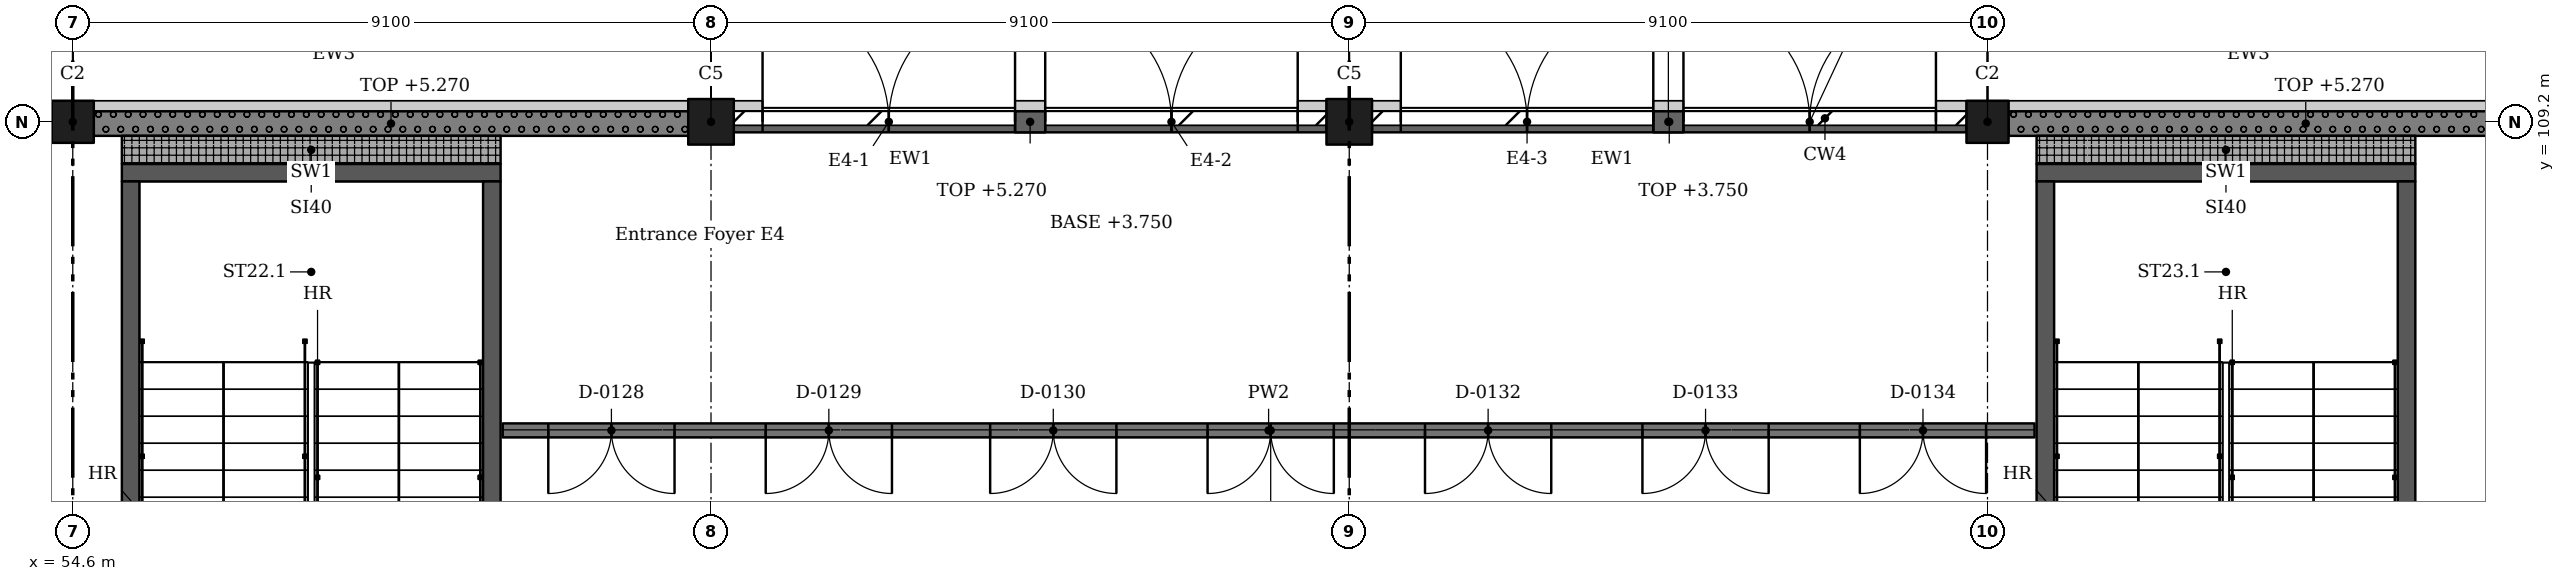
"""IFC4 building model, lengths in metres.
Left out: names, types, materials, properties, quantities, classifications, styles, units other than length and angle.
Written with IfcOpenShell. Run it as: python <this file> out.ifc"""

import sys

from ifc_helpers import new_model, si_unit, direction, frame, frame_2d, origin, origin_2d, place, context, subcontext, project, spatial, rectangle, extrude, element, fill, save


model = new_model("IFC4")
c1 = context("Model", 3, precision=1e-05, world=origin(), true_north=direction((0.0, 1.0)))
c2 = subcontext(c1, "Body", "Model", "MODEL_VIEW")
j1 = project(units=[si_unit("LENGTHUNIT", "METRE"), si_unit("PLANEANGLEUNIT", "RADIAN")], contexts=[c1])
p1 = place(None, origin())
s1 = spatial("IfcSite", under=j1, at=p1, CompositionType="ELEMENT")
p2 = place(p1, origin())
s2 = spatial("IfcBuilding", under=s1, at=p2, CompositionType="ELEMENT")
p3 = place(p2, origin())
s3 = spatial("IfcBuildingStorey", under=s2, at=p3, CompositionType="ELEMENT", Elevation=0.0)
p4 = place(p3, frame((54.6, 109.2, -0.4), z_axis=(0.0, 0.0, 1.0), x_axis=(1.0, 0.0, 0.0)))
e1 = element("IfcColumn", 1, at=p4, inside=s3, PredefinedType="COLUMN", context=c2, shape_type="SweptSolid", body=[
    extrude(rectangle(XDim=0.6, YDim=0.6, at=origin_2d()), origin(), (0.0, 0.0, 1.0), 6.77),
])
for number, where, z_axis, x_axis in (
    (2, (63.7, 109.2, -0.4), (0.0, 0.0, 1.0), (1.0, 0.0, 0.0)),
    (3, (72.8, 109.2, -0.4), (0.0, 0.0, 1.0), (1.0, 0.0, 0.0)),
):
    element("IfcColumn", number, at=place(p3, frame(where, z_axis=z_axis, x_axis=x_axis)), inside=s3, PredefinedType="COLUMN", context=c2, shape_type="SweptSolid", body=[
        extrude(rectangle(XDim=0.65, YDim=0.65, at=origin_2d()), origin(), (0.0, 0.0, 1.0), 6.77),
    ])
p5 = place(p3, frame((81.9, 109.2, -0.4), z_axis=(0.0, 0.0, 1.0), x_axis=(1.0, 0.0, 0.0)))
e4 = element("IfcColumn", 4, at=p5, inside=s3, PredefinedType="COLUMN", context=c2, shape_type="SweptSolid", body=[
    extrude(rectangle(XDim=0.6, YDim=0.6, at=origin_2d()), origin(), (0.0, 0.0, 1.0), 6.77),
])
p6 = place(p3, frame((60.7, 108.475, -0.4), z_axis=(0.0, 0.0, 1.0), x_axis=(-1.0, 0.0, 0.0)))
e5 = element("IfcWall", 5, at=p6, inside=s3, PredefinedType="SHEAR", context=c2, shape_type="SweptSolid", body=[
    extrude(rectangle(XDim=5.4, YDim=0.25, at=frame_2d((2.7, 0.0))), origin(), (0.0, 0.0, 1.0), 6.77),
])
for number, where, z_axis, x_axis in (
    (6, (55.425, 108.35, -0.4), (0.0, 0.0, 1.0), (0.0, -1.0, 0.0)),
    (7, (60.575, 108.35, -0.4), (0.0, 0.0, 1.0), (0.0, -1.0, 0.0)),
):
    element("IfcWall", number, at=place(p3, frame(where, z_axis=z_axis, x_axis=x_axis)), inside=s3, PredefinedType="SHEAR", context=c2, shape_type="SweptSolid", body=[
        extrude(rectangle(XDim=9.6, YDim=0.25, at=frame_2d((4.8, 0.0))), origin(), (0.0, 0.0, 1.0), 6.77),
    ])
p7 = place(p3, frame((88.0, 108.475, -0.4), z_axis=(0.0, 0.0, 1.0), x_axis=(-1.0, 0.0, 0.0)))
e8 = element("IfcWall", 8, at=p7, inside=s3, PredefinedType="SHEAR", context=c2, shape_type="SweptSolid", body=[
    extrude(rectangle(XDim=5.4, YDim=0.25, at=frame_2d((2.7, 0.0))), origin(), (0.0, 0.0, 1.0), 6.77),
])
for number, where, z_axis, x_axis in (
    (9, (82.725, 108.35, -0.4), (0.0, 0.0, 1.0), (0.0, -1.0, 0.0)),
    (10, (87.875, 108.35, -0.4), (0.0, 0.0, 1.0), (0.0, -1.0, 0.0)),
):
    element("IfcWall", number, at=place(p3, frame(where, z_axis=z_axis, x_axis=x_axis)), inside=s3, PredefinedType="SHEAR", context=c2, shape_type="SweptSolid", body=[
        extrude(rectangle(XDim=9.6, YDim=0.25, at=frame_2d((4.8, 0.0))), origin(), (0.0, 0.0, 1.0), 6.77),
    ])
p8 = place(p3, frame((90.675, 109.175, 0.0), z_axis=(0.0, 0.0, 1.0), x_axis=(-1.0, 0.0, 0.0)))
e11 = element("IfcWall", 11, at=p8, inside=s3, PredefinedType="SOLIDWALL", context=c2, shape_type="SweptSolid", body=[
    extrude(rectangle(XDim=8.475, YDim=0.35, at=frame_2d((4.238, 0.0))), origin(), (0.0, 0.0, 1.0), 5.27),
])
p9 = place(p3, frame((81.6, 109.2, 0.0), z_axis=(0.0, 0.0, 1.0), x_axis=(-1.0, 0.0, 0.0)))
e12 = element("IfcWall", 12, at=p9, inside=s3, PredefinedType="SOLIDWALL", context=c2, shape_type="SweptSolid", body=[
    extrude(rectangle(XDim=8.475, YDim=0.3, at=frame_2d((4.238, 0.0))), origin(), (0.0, 0.0, 1.0), 3.75),
])
p10 = place(p9, frame((4.465, 0.0, 0.0)))
e13 = element("IfcOpeningElement", 13, at=p10, cuts=e12, PredefinedType="OPENING", context=c2, shape_type="SweptSolid", body=[
    extrude(rectangle(XDim=3.6, YDim=2.7, at=frame_2d((1.8, 1.35))), frame((0.0, 0.16, 0.0), z_axis=(0.0, -1.0, 0.0), x_axis=(1.0, 0.0, 0.0)), (0.0, 0.0, 1.0), 0.32),
])
p11 = place(p9, frame((0.435, 0.0, 0.0)))
e14 = element("IfcOpeningElement", 14, at=p11, cuts=e12, PredefinedType="OPENING", context=c2, shape_type="SweptSolid", body=[
    extrude(rectangle(XDim=3.6, YDim=2.7, at=frame_2d((1.8, 1.35))), frame((0.0, 0.16, 0.0), z_axis=(0.0, -1.0, 0.0), x_axis=(1.0, 0.0, 0.0)), (0.0, 0.0, 1.0), 0.32),
])
p12 = place(p3, frame((77.565, 109.2, 3.75), z_axis=(0.0, 0.0, 1.0), x_axis=(-1.0, 0.0, 0.0)))
e15 = element("IfcWall", 15, at=p12, inside=s3, PredefinedType="SOLIDWALL", context=c2, shape_type="SweptSolid", body=[
    extrude(rectangle(XDim=0.43, YDim=0.3, at=frame_2d((0.215, 0.0))), origin(), (0.0, 0.0, 1.0), 1.52),
])
p13 = place(p3, frame((72.475, 109.2, 0.0), z_axis=(0.0, 0.0, 1.0), x_axis=(-1.0, 0.0, 0.0)))
e16 = element("IfcWall", 16, at=p13, inside=s3, PredefinedType="SOLIDWALL", context=c2, shape_type="SweptSolid", body=[
    extrude(rectangle(XDim=8.45, YDim=0.3, at=frame_2d((4.225, 0.0))), origin(), (0.0, 0.0, 1.0), 3.75),
])
p14 = place(p13, frame((4.44, 0.0, 0.0)))
e17 = element("IfcOpeningElement", 17, at=p14, cuts=e16, PredefinedType="OPENING", context=c2, shape_type="SweptSolid", body=[
    extrude(rectangle(XDim=3.6, YDim=2.7, at=frame_2d((1.8, 1.35))), frame((0.0, 0.16, 0.0), z_axis=(0.0, -1.0, 0.0), x_axis=(1.0, 0.0, 0.0)), (0.0, 0.0, 1.0), 0.32),
])
p15 = place(p13, frame((0.41, 0.0, 0.0)))
e18 = element("IfcOpeningElement", 18, at=p15, cuts=e16, PredefinedType="OPENING", context=c2, shape_type="SweptSolid", body=[
    extrude(rectangle(XDim=3.6, YDim=2.7, at=frame_2d((1.8, 1.35))), frame((0.0, 0.16, 0.0), z_axis=(0.0, -1.0, 0.0), x_axis=(1.0, 0.0, 0.0)), (0.0, 0.0, 1.0), 0.32),
])
p16 = place(p3, frame((68.465, 109.2, 3.75), z_axis=(0.0, 0.0, 1.0), x_axis=(-1.0, 0.0, 0.0)))
e19 = element("IfcWall", 19, at=p16, inside=s3, PredefinedType="SOLIDWALL", context=c2, shape_type="SweptSolid", body=[
    extrude(rectangle(XDim=0.43, YDim=0.3, at=frame_2d((0.215, 0.0))), origin(), (0.0, 0.0, 1.0), 1.52),
])
p17 = place(p3, frame((63.375, 109.175, 0.0), z_axis=(0.0, 0.0, 1.0), x_axis=(-1.0, 0.0, 0.0)))
e20 = element("IfcWall", 20, at=p17, inside=s3, PredefinedType="SOLIDWALL", context=c2, shape_type="SweptSolid", body=[
    extrude(rectangle(XDim=8.475, YDim=0.35, at=frame_2d((4.238, 0.0))), origin(), (0.0, 0.0, 1.0), 5.27),
])
for number, where, z_axis, x_axis in (
    (21, (55.3, 108.8, 0.0), (0.0, 0.0, 1.0), (1.0, 0.0, 0.0)),
    (22, (82.6, 108.8, 0.0), (0.0, 0.0, 1.0), (1.0, 0.0, 0.0)),
):
    element("IfcWall", number, at=place(p3, frame(where, z_axis=z_axis, x_axis=x_axis)), inside=s3, PredefinedType="SOLIDWALL", context=c2, shape_type="SweptSolid", body=[
        extrude(rectangle(XDim=5.4, YDim=0.4, at=frame_2d((2.7, 0.0))), origin(), (0.0, 0.0, 1.0), 6.02),
    ])
p18 = place(p3, frame((60.73, 104.8, 0.0), z_axis=(0.0, 0.0, 1.0), x_axis=(1.0, 0.0, 0.0)))
e23 = element("IfcWall", 23, at=p18, inside=s3, PredefinedType="PARTITIONING", context=c2, shape_type="SweptSolid", body=[
    extrude(rectangle(XDim=21.84, YDim=0.2, at=frame_2d((10.92, 0.0))), origin(), (0.0, 0.0, 1.0), 6.02),
])
p19 = place(p18, frame((0.65, 0.0, 0.0)))
e24 = element("IfcOpeningElement", 24, at=p19, cuts=e23, PredefinedType="OPENING", context=c2, shape_type="SweptSolid", body=[
    extrude(rectangle(XDim=1.8, YDim=2.4, at=frame_2d((0.9, 1.2))), frame((0.0, 0.11, 0.0), z_axis=(0.0, -1.0, 0.0), x_axis=(1.0, 0.0, 0.0)), (0.0, 0.0, 1.0), 0.22),
])
p20 = place(p18, frame((3.75, 0.0, 0.0)))
e25 = element("IfcOpeningElement", 25, at=p20, cuts=e23, PredefinedType="OPENING", context=c2, shape_type="SweptSolid", body=[
    extrude(rectangle(XDim=1.8, YDim=2.4, at=frame_2d((0.9, 1.2))), frame((0.0, 0.11, 0.0), z_axis=(0.0, -1.0, 0.0), x_axis=(1.0, 0.0, 0.0)), (0.0, 0.0, 1.0), 0.22),
])
p21 = place(p18, frame((6.95, 0.0, 0.0)))
e26 = element("IfcOpeningElement", 26, at=p21, cuts=e23, PredefinedType="OPENING", context=c2, shape_type="SweptSolid", body=[
    extrude(rectangle(XDim=1.8, YDim=2.4, at=frame_2d((0.9, 1.2))), frame((0.0, 0.11, 0.0), z_axis=(0.0, -1.0, 0.0), x_axis=(1.0, 0.0, 0.0)), (0.0, 0.0, 1.0), 0.22),
])
p22 = place(p18, frame((10.05, 0.0, 0.0)))
e27 = element("IfcOpeningElement", 27, at=p22, cuts=e23, PredefinedType="OPENING", context=c2, shape_type="SweptSolid", body=[
    extrude(rectangle(XDim=1.8, YDim=2.4, at=frame_2d((0.9, 1.2))), frame((0.0, 0.11, 0.0), z_axis=(0.0, -1.0, 0.0), x_axis=(1.0, 0.0, 0.0)), (0.0, 0.0, 1.0), 0.22),
])
p23 = place(p18, frame((13.15, 0.0, 0.0)))
e28 = element("IfcOpeningElement", 28, at=p23, cuts=e23, PredefinedType="OPENING", context=c2, shape_type="SweptSolid", body=[
    extrude(rectangle(XDim=1.8, YDim=2.4, at=frame_2d((0.9, 1.2))), frame((0.0, 0.11, 0.0), z_axis=(0.0, -1.0, 0.0), x_axis=(1.0, 0.0, 0.0)), (0.0, 0.0, 1.0), 0.22),
])
p24 = place(p18, frame((16.25, 0.0, 0.0)))
e29 = element("IfcOpeningElement", 29, at=p24, cuts=e23, PredefinedType="OPENING", context=c2, shape_type="SweptSolid", body=[
    extrude(rectangle(XDim=1.8, YDim=2.4, at=frame_2d((0.9, 1.2))), frame((0.0, 0.11, 0.0), z_axis=(0.0, -1.0, 0.0), x_axis=(1.0, 0.0, 0.0)), (0.0, 0.0, 1.0), 0.22),
])
p25 = place(p18, frame((19.35, 0.0, 0.0)))
e30 = element("IfcOpeningElement", 30, at=p25, cuts=e23, PredefinedType="OPENING", context=c2, shape_type="SweptSolid", body=[
    extrude(rectangle(XDim=1.8, YDim=2.4, at=frame_2d((0.9, 1.2))), frame((0.0, 0.11, 0.0), z_axis=(0.0, -1.0, 0.0), x_axis=(1.0, 0.0, 0.0)), (0.0, 0.0, 1.0), 0.22),
])
p26 = place(p10, frame((3.6, 0.0, 0.0), z_axis=(0.0, 0.0, 1.0), x_axis=(-1.0, 0.0, 0.0)))
e31 = element("IfcDoor", 31, at=p26, inside=s3, OperationType="DOUBLE_DOOR_SINGLE_SWING", PredefinedType="DOOR", context=c2, shape_type="SweptSolid", body=[
    extrude(rectangle(XDim=3.6, YDim=2.7, at=frame_2d((1.8, 1.35))), frame((0.0, 0.025, 0.0), z_axis=(0.0, -1.0, 0.0), x_axis=(1.0, 0.0, 0.0)), (0.0, 0.0, 1.0), 0.05),
])
fill(e13, e31)
p27 = place(p11, frame((3.6, 0.0, 0.0), z_axis=(0.0, 0.0, 1.0), x_axis=(-1.0, 0.0, 0.0)))
e32 = element("IfcDoor", 32, at=p27, inside=s3, OperationType="DOUBLE_DOOR_SINGLE_SWING", PredefinedType="DOOR", context=c2, shape_type="SweptSolid", body=[
    extrude(rectangle(XDim=3.6, YDim=2.7, at=frame_2d((1.8, 1.35))), frame((0.0, 0.025, 0.0), z_axis=(0.0, -1.0, 0.0), x_axis=(1.0, 0.0, 0.0)), (0.0, 0.0, 1.0), 0.05),
])
fill(e14, e32)
p28 = place(p14, frame((3.6, 0.0, 0.0), z_axis=(0.0, 0.0, 1.0), x_axis=(-1.0, 0.0, 0.0)))
e33 = element("IfcDoor", 33, at=p28, inside=s3, OperationType="DOUBLE_DOOR_SINGLE_SWING", PredefinedType="DOOR", context=c2, shape_type="SweptSolid", body=[
    extrude(rectangle(XDim=3.6, YDim=2.7, at=frame_2d((1.8, 1.35))), frame((0.0, 0.025, 0.0), z_axis=(0.0, -1.0, 0.0), x_axis=(1.0, 0.0, 0.0)), (0.0, 0.0, 1.0), 0.05),
])
fill(e17, e33)
p29 = place(p15, frame((3.6, 0.0, 0.0), z_axis=(0.0, 0.0, 1.0), x_axis=(-1.0, 0.0, 0.0)))
e34 = element("IfcDoor", 34, at=p29, inside=s3, OperationType="DOUBLE_DOOR_SINGLE_SWING", PredefinedType="DOOR", context=c2, shape_type="SweptSolid", body=[
    extrude(rectangle(XDim=3.6, YDim=2.7, at=frame_2d((1.8, 1.35))), frame((0.0, 0.025, 0.0), z_axis=(0.0, -1.0, 0.0), x_axis=(1.0, 0.0, 0.0)), (0.0, 0.0, 1.0), 0.05),
])
fill(e18, e34)
p30 = place(p19, origin())
e35 = element("IfcDoor", 35, at=p30, inside=s3, OperationType="DOUBLE_DOOR_SINGLE_SWING", PredefinedType="DOOR", context=c2, shape_type="SweptSolid", body=[
    extrude(rectangle(XDim=1.8, YDim=2.4, at=frame_2d((0.9, 1.2))), frame((0.0, 0.025, 0.0), z_axis=(0.0, -1.0, 0.0), x_axis=(1.0, 0.0, 0.0)), (0.0, 0.0, 1.0), 0.05),
])
fill(e24, e35)
p31 = place(p20, origin())
e36 = element("IfcDoor", 36, at=p31, inside=s3, OperationType="DOUBLE_DOOR_SINGLE_SWING", PredefinedType="DOOR", context=c2, shape_type="SweptSolid", body=[
    extrude(rectangle(XDim=1.8, YDim=2.4, at=frame_2d((0.9, 1.2))), frame((0.0, 0.025, 0.0), z_axis=(0.0, -1.0, 0.0), x_axis=(1.0, 0.0, 0.0)), (0.0, 0.0, 1.0), 0.05),
])
fill(e25, e36)
p32 = place(p21, origin())
e37 = element("IfcDoor", 37, at=p32, inside=s3, OperationType="DOUBLE_DOOR_SINGLE_SWING", PredefinedType="DOOR", context=c2, shape_type="SweptSolid", body=[
    extrude(rectangle(XDim=1.8, YDim=2.4, at=frame_2d((0.9, 1.2))), frame((0.0, 0.025, 0.0), z_axis=(0.0, -1.0, 0.0), x_axis=(1.0, 0.0, 0.0)), (0.0, 0.0, 1.0), 0.05),
])
fill(e26, e37)
p33 = place(p22, origin())
e38 = element("IfcDoor", 38, at=p33, inside=s3, OperationType="DOUBLE_DOOR_SINGLE_SWING", PredefinedType="DOOR", context=c2, shape_type="SweptSolid", body=[
    extrude(rectangle(XDim=1.8, YDim=2.4, at=frame_2d((0.9, 1.2))), frame((0.0, 0.025, 0.0), z_axis=(0.0, -1.0, 0.0), x_axis=(1.0, 0.0, 0.0)), (0.0, 0.0, 1.0), 0.05),
])
fill(e27, e38)
p34 = place(p23, origin())
e39 = element("IfcDoor", 39, at=p34, inside=s3, OperationType="DOUBLE_DOOR_SINGLE_SWING", PredefinedType="DOOR", context=c2, shape_type="SweptSolid", body=[
    extrude(rectangle(XDim=1.8, YDim=2.4, at=frame_2d((0.9, 1.2))), frame((0.0, 0.025, 0.0), z_axis=(0.0, -1.0, 0.0), x_axis=(1.0, 0.0, 0.0)), (0.0, 0.0, 1.0), 0.05),
])
fill(e28, e39)
p35 = place(p24, origin())
e40 = element("IfcDoor", 40, at=p35, inside=s3, OperationType="DOUBLE_DOOR_SINGLE_SWING", PredefinedType="DOOR", context=c2, shape_type="SweptSolid", body=[
    extrude(rectangle(XDim=1.8, YDim=2.4, at=frame_2d((0.9, 1.2))), frame((0.0, 0.025, 0.0), z_axis=(0.0, -1.0, 0.0), x_axis=(1.0, 0.0, 0.0)), (0.0, 0.0, 1.0), 0.05),
])
fill(e29, e40)
p36 = place(p25, origin())
e41 = element("IfcDoor", 41, at=p36, inside=s3, OperationType="DOUBLE_DOOR_SINGLE_SWING", PredefinedType="DOOR", context=c2, shape_type="SweptSolid", body=[
    extrude(rectangle(XDim=1.8, YDim=2.4, at=frame_2d((0.9, 1.2))), frame((0.0, 0.025, 0.0), z_axis=(0.0, -1.0, 0.0), x_axis=(1.0, 0.0, 0.0)), (0.0, 0.0, 1.0), 0.05),
])
fill(e30, e41)
save(model, sys.argv[1])
